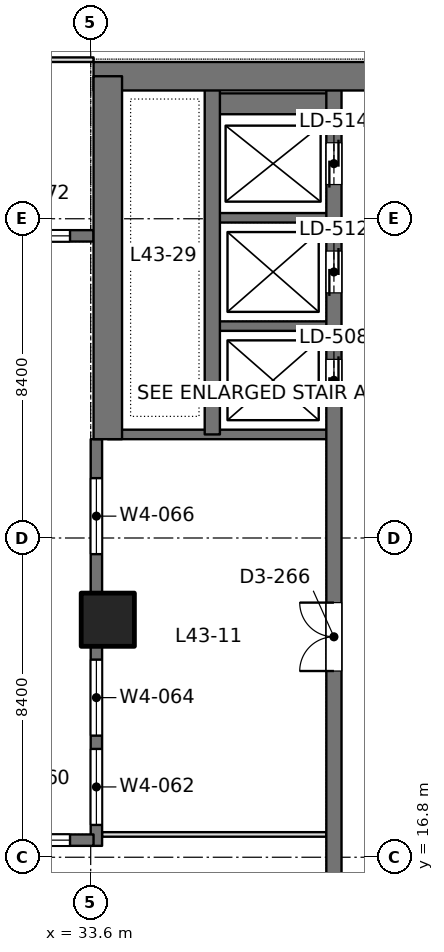
"""IFC4 building model, lengths in metres.
Left out: names, types, materials, properties, quantities, classifications, styles, units other than length and angle.
Written with IfcOpenShell. Run it as: python <this file> out.ifc"""

import sys

from ifc_helpers import new_model, si_unit, direction, frame, frame_2d, origin, origin_2d, place, context, subcontext, project, spatial, rectangle, extrude, element, fill, save


model = new_model("IFC4")
c1 = context("Model", 3, precision=1e-05, world=origin(), true_north=direction((0.0, 1.0)))
c2 = subcontext(c1, "Body", "Model", "MODEL_VIEW")
j1 = project(units=[si_unit("LENGTHUNIT", "METRE"), si_unit("PLANEANGLEUNIT", "RADIAN")], contexts=[c1])
p1 = place(None, origin())
s1 = spatial("IfcSite", under=j1, at=p1, CompositionType="ELEMENT")
p2 = place(p1, origin())
s2 = spatial("IfcBuilding", under=s1, at=p2, CompositionType="ELEMENT")
p3 = place(p2, frame((0.0, 0.0, 190.2)))
s3 = spatial("IfcBuildingStorey", under=s2, at=p3, CompositionType="ELEMENT", Elevation=190.2)
p4 = place(p3, frame((34.05, 23.05, 0.0), z_axis=(0.0, 0.0, 1.0), x_axis=(1.0, 0.0, 0.0)))
e1 = element("IfcColumn", 1, at=p4, inside=s3, PredefinedType="COLUMN", context=c2, shape_type="SweptSolid", body=[
    extrude(rectangle(XDim=1.4, YDim=1.4, at=origin_2d()), origin(), (0.0, 0.0, 1.0), 4.2),
])
p5 = place(p3, frame((33.675, 37.35, 0.0), z_axis=(0.0, 0.0, 1.0), x_axis=(1.0, 0.0, 0.0)))
e2 = element("IfcWall", 2, at=p5, inside=s3, PredefinedType="SHEAR", context=c2, shape_type="SweptSolid", body=[
    extrude(rectangle(XDim=17.85, YDim=0.75, at=frame_2d((8.925, 0.0))), origin(), (0.0, 0.0, 1.0), 4.2),
])
p6 = place(p5, frame((7.175, 0.0, 0.0)))
e3 = element("IfcOpeningElement", 3, at=p6, cuts=e2, PredefinedType="OPENING", context=c2, shape_type="SweptSolid", body=[
    extrude(rectangle(XDim=1.8, YDim=2.4, at=frame_2d((0.9, 1.2))), frame((0.0, 0.385, 0.0), z_axis=(0.0, -1.0, 0.0), x_axis=(1.0, 0.0, 0.0)), (0.0, 0.0, 1.0), 0.77),
])
p7 = place(p3, frame((34.05, 27.8, 0.0), z_axis=(0.0, 0.0, 1.0), x_axis=(0.0, 1.0, 0.0)))
e4 = element("IfcWall", 4, at=p7, inside=s3, PredefinedType="SHEAR", context=c2, shape_type="SweptSolid", body=[
    extrude(rectangle(XDim=9.55, YDim=0.75, at=frame_2d((4.775, 0.0))), origin(), (0.0, 0.0, 1.0), 4.2),
])
p8 = place(p3, frame((40.0, 13.05, 0.0), z_axis=(0.0, 0.0, 1.0), x_axis=(0.0, 1.0, 0.0)))
e5 = element("IfcWall", 5, at=p8, inside=s3, PredefinedType="SHEAR", context=c2, shape_type="SweptSolid", body=[
    extrude(rectangle(XDim=24.3, YDim=0.4, at=frame_2d((12.15, 0.0))), origin(), (0.0, 0.0, 1.0), 4.2),
])
p9 = place(p8, frame((15.75, 0.0, 0.0)))
e6 = element("IfcOpeningElement", 6, at=p9, cuts=e5, PredefinedType="OPENING", context=c2, shape_type="SweptSolid", body=[
    extrude(rectangle(XDim=1.1, YDim=2.2, at=frame_2d((0.55, 1.1))), frame((0.0, 0.21, 0.0), z_axis=(0.0, -1.0, 0.0), x_axis=(1.0, 0.0, 0.0)), (0.0, 0.0, 1.0), 0.42),
])
p10 = place(p8, frame((18.6, 0.0, 0.0)))
e7 = element("IfcOpeningElement", 7, at=p10, cuts=e5, PredefinedType="OPENING", context=c2, shape_type="SweptSolid", body=[
    extrude(rectangle(XDim=1.1, YDim=2.2, at=frame_2d((0.55, 1.1))), frame((0.0, 0.21, 0.0), z_axis=(0.0, -1.0, 0.0), x_axis=(1.0, 0.0, 0.0)), (0.0, 0.0, 1.0), 0.42),
])
p11 = place(p8, frame((21.45, 0.0, 0.0)))
e8 = element("IfcOpeningElement", 8, at=p11, cuts=e5, PredefinedType="OPENING", context=c2, shape_type="SweptSolid", body=[
    extrude(rectangle(XDim=1.1, YDim=2.2, at=frame_2d((0.55, 1.1))), frame((0.0, 0.21, 0.0), z_axis=(0.0, -1.0, 0.0), x_axis=(1.0, 0.0, 0.0)), (0.0, 0.0, 1.0), 0.42),
])
p12 = place(p8, frame((8.65, 0.0, 0.0)))
e9 = element("IfcOpeningElement", 9, at=p12, cuts=e5, PredefinedType="OPENING", context=c2, shape_type="SweptSolid", body=[
    extrude(rectangle(XDim=1.8, YDim=2.4, at=frame_2d((0.9, 1.2))), frame((0.0, 0.21, 0.0), z_axis=(0.0, -1.0, 0.0), x_axis=(1.0, 0.0, 0.0)), (0.0, 0.0, 1.0), 0.42),
])
p13 = place(p3, frame((36.8, 27.925, 0.0), z_axis=(0.0, 0.0, 1.0), x_axis=(0.0, 1.0, 0.0)))
e10 = element("IfcWall", 10, at=p13, inside=s3, PredefinedType="SHEAR", context=c2, shape_type="SweptSolid", body=[
    extrude(rectangle(XDim=9.425, YDim=0.4, at=frame_2d((4.712, 0.0))), origin(), (0.0, 0.0, 1.0), 4.2),
])
p14 = place(p3, frame((40.0, 27.925, 0.0), z_axis=(0.0, 0.0, 1.0), x_axis=(-1.0, 0.0, 0.0)))
e11 = element("IfcWall", 11, at=p14, inside=s3, PredefinedType="SHEAR", context=c2, shape_type="SweptSolid", body=[
    extrude(rectangle(XDim=5.95, YDim=0.25, at=frame_2d((2.975, 0.0))), origin(), (0.0, 0.0, 1.0), 4.2),
])
for number, where, z_axis, x_axis in (
    (12, (40.0, 30.775, 0.0), (0.0, 0.0, 1.0), (-1.0, 0.0, 0.0)),
    (13, (40.0, 33.625, 0.0), (0.0, 0.0, 1.0), (-1.0, 0.0, 0.0)),
):
    element("IfcWall", number, at=place(p3, frame(where, z_axis=z_axis, x_axis=x_axis)), inside=s3, PredefinedType="SHEAR", context=c2, shape_type="SweptSolid", body=[
        extrude(rectangle(XDim=3.2, YDim=0.25, at=frame_2d((1.6, 0.0))), origin(), (0.0, 0.0, 1.0), 4.2),
    ])
p15 = place(p3, frame((40.0, 36.625, 0.0), z_axis=(0.0, 0.0, 1.0), x_axis=(-1.0, 0.0, 0.0)))
e14 = element("IfcWall", 14, at=p15, inside=s3, PredefinedType="SHEAR", context=c2, shape_type="SweptSolid", body=[
    extrude(rectangle(XDim=3.2, YDim=0.55, at=frame_2d((1.6, 0.0))), origin(), (0.0, 0.0, 1.0), 4.2),
])
p16 = place(p3, frame((33.75, 17.1, 0.0), z_axis=(0.0, 0.0, 1.0), x_axis=(0.0, 1.0, 0.0)))
e15 = element("IfcWall", 15, at=p16, inside=s3, PredefinedType="SOLIDWALL", context=c2, shape_type="SweptSolid", body=[
    extrude(rectangle(XDim=10.7, YDim=0.3, at=frame_2d((5.35, 0.0))), origin(), (0.0, 0.0, 1.0), 4.05),
])
p17 = place(p16, frame((0.55, 0.0, 0.9)))
e16 = element("IfcOpeningElement", 16, at=p17, cuts=e15, PredefinedType="OPENING", context=c2, shape_type="SweptSolid", body=[
    extrude(rectangle(XDim=2.0, YDim=1.9, at=frame_2d((1.0, 0.95))), frame((0.0, 0.16, 0.0), z_axis=(0.0, -1.0, 0.0), x_axis=(1.0, 0.0, 0.0)), (0.0, 0.0, 1.0), 0.32),
])
p18 = place(p16, frame((2.9, 0.0, 0.9)))
e17 = element("IfcOpeningElement", 17, at=p18, cuts=e15, PredefinedType="OPENING", context=c2, shape_type="SweptSolid", body=[
    extrude(rectangle(XDim=2.0, YDim=1.9, at=frame_2d((1.0, 0.95))), frame((0.0, 0.16, 0.0), z_axis=(0.0, -1.0, 0.0), x_axis=(1.0, 0.0, 0.0)), (0.0, 0.0, 1.0), 0.32),
])
p19 = place(p16, frame((7.675, 0.0, 0.9)))
e18 = element("IfcOpeningElement", 18, at=p19, cuts=e15, PredefinedType="OPENING", context=c2, shape_type="SweptSolid", body=[
    extrude(rectangle(XDim=2.0, YDim=1.9, at=frame_2d((1.0, 0.95))), frame((0.0, 0.16, 0.0), z_axis=(0.0, -1.0, 0.0), x_axis=(1.0, 0.0, 0.0)), (0.0, 0.0, 1.0), 0.32),
])
p20 = place(p3, frame((25.75, 17.25, 0.0), z_axis=(0.0, 0.0, 1.0), x_axis=(1.0, 0.0, 0.0)))
e19 = element("IfcWall", 19, at=p20, inside=s3, PredefinedType="SOLIDWALL", context=c2, shape_type="SweptSolid", body=[
    extrude(rectangle(XDim=7.925, YDim=0.3, at=frame_2d((3.962, 0.0))), origin(), (0.0, 0.0, 1.0), 4.05),
])
p21 = place(p20, frame((0.069, 0.0, 0.9)))
e20 = element("IfcOpeningElement", 20, at=p21, cuts=e19, PredefinedType="OPENING", context=c2, shape_type="SweptSolid", body=[
    extrude(rectangle(XDim=2.0, YDim=1.9, at=frame_2d((1.0, 0.95))), frame((0.0, 0.16, 0.0), z_axis=(0.0, -1.0, 0.0), x_axis=(1.0, 0.0, 0.0)), (0.0, 0.0, 1.0), 0.32),
])
p22 = place(p20, frame((2.688, 0.0, 0.9)))
e21 = element("IfcOpeningElement", 21, at=p22, cuts=e19, PredefinedType="OPENING", context=c2, shape_type="SweptSolid", body=[
    extrude(rectangle(XDim=2.0, YDim=1.9, at=frame_2d((1.0, 0.95))), frame((0.0, 0.16, 0.0), z_axis=(0.0, -1.0, 0.0), x_axis=(1.0, 0.0, 0.0)), (0.0, 0.0, 1.0), 0.32),
])
p23 = place(p20, frame((5.306, 0.0, 0.9)))
e22 = element("IfcOpeningElement", 22, at=p23, cuts=e19, PredefinedType="OPENING", context=c2, shape_type="SweptSolid", body=[
    extrude(rectangle(XDim=2.0, YDim=1.9, at=frame_2d((1.0, 0.95))), frame((0.0, 0.16, 0.0), z_axis=(0.0, -1.0, 0.0), x_axis=(1.0, 0.0, 0.0)), (0.0, 0.0, 1.0), 0.32),
])
p24 = place(p3, frame((25.75, 33.15, 0.0), z_axis=(0.0, 0.0, 1.0), x_axis=(1.0, 0.0, 0.0)))
e23 = element("IfcWall", 23, at=p24, inside=s3, PredefinedType="SOLIDWALL", context=c2, shape_type="SweptSolid", body=[
    extrude(rectangle(XDim=7.925, YDim=0.3, at=frame_2d((3.962, 0.0))), origin(), (0.0, 0.0, 1.0), 4.05),
])
p25 = place(p24, frame((0.069, 0.0, 0.9)))
e24 = element("IfcOpeningElement", 24, at=p25, cuts=e23, PredefinedType="OPENING", context=c2, shape_type="SweptSolid", body=[
    extrude(rectangle(XDim=2.0, YDim=1.9, at=frame_2d((1.0, 0.95))), frame((0.0, 0.16, 0.0), z_axis=(0.0, -1.0, 0.0), x_axis=(1.0, 0.0, 0.0)), (0.0, 0.0, 1.0), 0.32),
])
p26 = place(p24, frame((2.688, 0.0, 0.9)))
e25 = element("IfcOpeningElement", 25, at=p26, cuts=e23, PredefinedType="OPENING", context=c2, shape_type="SweptSolid", body=[
    extrude(rectangle(XDim=2.0, YDim=1.9, at=frame_2d((1.0, 0.95))), frame((0.0, 0.16, 0.0), z_axis=(0.0, -1.0, 0.0), x_axis=(1.0, 0.0, 0.0)), (0.0, 0.0, 1.0), 0.32),
])
p27 = place(p24, frame((5.306, 0.0, 0.9)))
e26 = element("IfcOpeningElement", 26, at=p27, cuts=e23, PredefinedType="OPENING", context=c2, shape_type="SweptSolid", body=[
    extrude(rectangle(XDim=2.0, YDim=1.9, at=frame_2d((1.0, 0.95))), frame((0.0, 0.16, 0.0), z_axis=(0.0, -1.0, 0.0), x_axis=(1.0, 0.0, 0.0)), (0.0, 0.0, 1.0), 0.32),
])
p28 = place(p3, frame((33.898, 17.4, 0.0), z_axis=(0.0, 0.0, 1.0), x_axis=(1.0, 0.0, 0.0)))
e27 = element("IfcWall", 27, at=p28, inside=s3, PredefinedType="PARTITIONING", context=c2, shape_type="SweptSolid", body=[
    extrude(rectangle(XDim=5.904, YDim=0.12, at=frame_2d((2.952, 0.0))), origin(), (0.0, 0.0, 1.0), 3.55),
])
p29 = place(p3, frame((16.725, 37.785, 0.0), z_axis=(0.0, 0.0, 1.0), x_axis=(1.0, 0.0, 0.0)))
e28 = element("IfcWall", 28, at=p29, inside=s3, PredefinedType="PARTITIONING", context=c2, shape_type="SweptSolid", body=[
    extrude(rectangle(XDim=16.95, YDim=0.12, at=frame_2d((8.475, 0.0))), origin(), (0.0, 0.0, 1.0), 3.55),
])
p30 = place(p29, frame((7.575, 0.0, 0.0)))
e29 = element("IfcOpeningElement", 29, at=p30, cuts=e28, PredefinedType="OPENING", context=c2, shape_type="SweptSolid", body=[
    extrude(rectangle(XDim=1.8, YDim=2.2, at=frame_2d((0.9, 1.1))), frame((0.0, 0.07, 0.0), z_axis=(0.0, -1.0, 0.0), x_axis=(1.0, 0.0, 0.0)), (0.0, 0.0, 1.0), 0.14),
])
p31 = place(p17, origin())
e30 = element("IfcWindow", 30, at=p31, inside=s3, PartitioningType="SINGLE_PANEL", PredefinedType="WINDOW", context=c2, shape_type="SweptSolid", body=[
    extrude(rectangle(XDim=2.0, YDim=1.9, at=frame_2d((1.0, 0.95))), frame((0.0, 0.03, 0.0), z_axis=(0.0, -1.0, 0.0), x_axis=(1.0, 0.0, 0.0)), (0.0, 0.0, 1.0), 0.06),
])
fill(e16, e30)
p32 = place(p18, origin())
e31 = element("IfcWindow", 31, at=p32, inside=s3, PartitioningType="SINGLE_PANEL", PredefinedType="WINDOW", context=c2, shape_type="SweptSolid", body=[
    extrude(rectangle(XDim=2.0, YDim=1.9, at=frame_2d((1.0, 0.95))), frame((0.0, 0.03, 0.0), z_axis=(0.0, -1.0, 0.0), x_axis=(1.0, 0.0, 0.0)), (0.0, 0.0, 1.0), 0.06),
])
fill(e17, e31)
p33 = place(p19, origin())
e32 = element("IfcWindow", 32, at=p33, inside=s3, PartitioningType="SINGLE_PANEL", PredefinedType="WINDOW", context=c2, shape_type="SweptSolid", body=[
    extrude(rectangle(XDim=2.0, YDim=1.9, at=frame_2d((1.0, 0.95))), frame((0.0, 0.03, 0.0), z_axis=(0.0, -1.0, 0.0), x_axis=(1.0, 0.0, 0.0)), (0.0, 0.0, 1.0), 0.06),
])
fill(e18, e32)
p34 = place(p23, origin())
e33 = element("IfcWindow", 33, at=p34, inside=s3, PartitioningType="SINGLE_PANEL", PredefinedType="WINDOW", context=c2, shape_type="SweptSolid", body=[
    extrude(rectangle(XDim=2.0, YDim=1.9, at=frame_2d((1.0, 0.95))), frame((0.0, 0.03, 0.0), z_axis=(0.0, -1.0, 0.0), x_axis=(1.0, 0.0, 0.0)), (0.0, 0.0, 1.0), 0.06),
])
fill(e22, e33)
p35 = place(p27, origin())
e34 = element("IfcWindow", 34, at=p35, inside=s3, PartitioningType="SINGLE_PANEL", PredefinedType="WINDOW", context=c2, shape_type="SweptSolid", body=[
    extrude(rectangle(XDim=2.0, YDim=1.9, at=frame_2d((1.0, 0.95))), frame((0.0, 0.03, 0.0), z_axis=(0.0, -1.0, 0.0), x_axis=(1.0, 0.0, 0.0)), (0.0, 0.0, 1.0), 0.06),
])
fill(e26, e34)
p36 = place(p9, origin())
e35 = element("IfcDoor", 35, at=p36, inside=s3, OperationType="DOUBLE_DOOR_SLIDING", PredefinedType="DOOR", context=c2, shape_type="SweptSolid", body=[
    extrude(rectangle(XDim=1.1, YDim=2.2, at=frame_2d((0.55, 1.1))), frame((0.0, 0.025, 0.0), z_axis=(0.0, -1.0, 0.0), x_axis=(1.0, 0.0, 0.0)), (0.0, 0.0, 1.0), 0.05),
])
fill(e6, e35)
p37 = place(p10, origin())
e36 = element("IfcDoor", 36, at=p37, inside=s3, OperationType="DOUBLE_DOOR_SLIDING", PredefinedType="DOOR", context=c2, shape_type="SweptSolid", body=[
    extrude(rectangle(XDim=1.1, YDim=2.2, at=frame_2d((0.55, 1.1))), frame((0.0, 0.025, 0.0), z_axis=(0.0, -1.0, 0.0), x_axis=(1.0, 0.0, 0.0)), (0.0, 0.0, 1.0), 0.05),
])
fill(e7, e36)
p38 = place(p11, origin())
e37 = element("IfcDoor", 37, at=p38, inside=s3, OperationType="DOUBLE_DOOR_SLIDING", PredefinedType="DOOR", context=c2, shape_type="SweptSolid", body=[
    extrude(rectangle(XDim=1.1, YDim=2.2, at=frame_2d((0.55, 1.1))), frame((0.0, 0.025, 0.0), z_axis=(0.0, -1.0, 0.0), x_axis=(1.0, 0.0, 0.0)), (0.0, 0.0, 1.0), 0.05),
])
fill(e8, e37)
p39 = place(p12, origin())
e38 = element("IfcDoor", 38, at=p39, inside=s3, OperationType="DOUBLE_DOOR_SINGLE_SWING", PredefinedType="DOOR", context=c2, shape_type="SweptSolid", body=[
    extrude(rectangle(XDim=1.8, YDim=2.4, at=frame_2d((0.9, 1.2))), frame((0.0, 0.025, 0.0), z_axis=(0.0, -1.0, 0.0), x_axis=(1.0, 0.0, 0.0)), (0.0, 0.0, 1.0), 0.05),
])
fill(e9, e38)
save(model, sys.argv[1])
